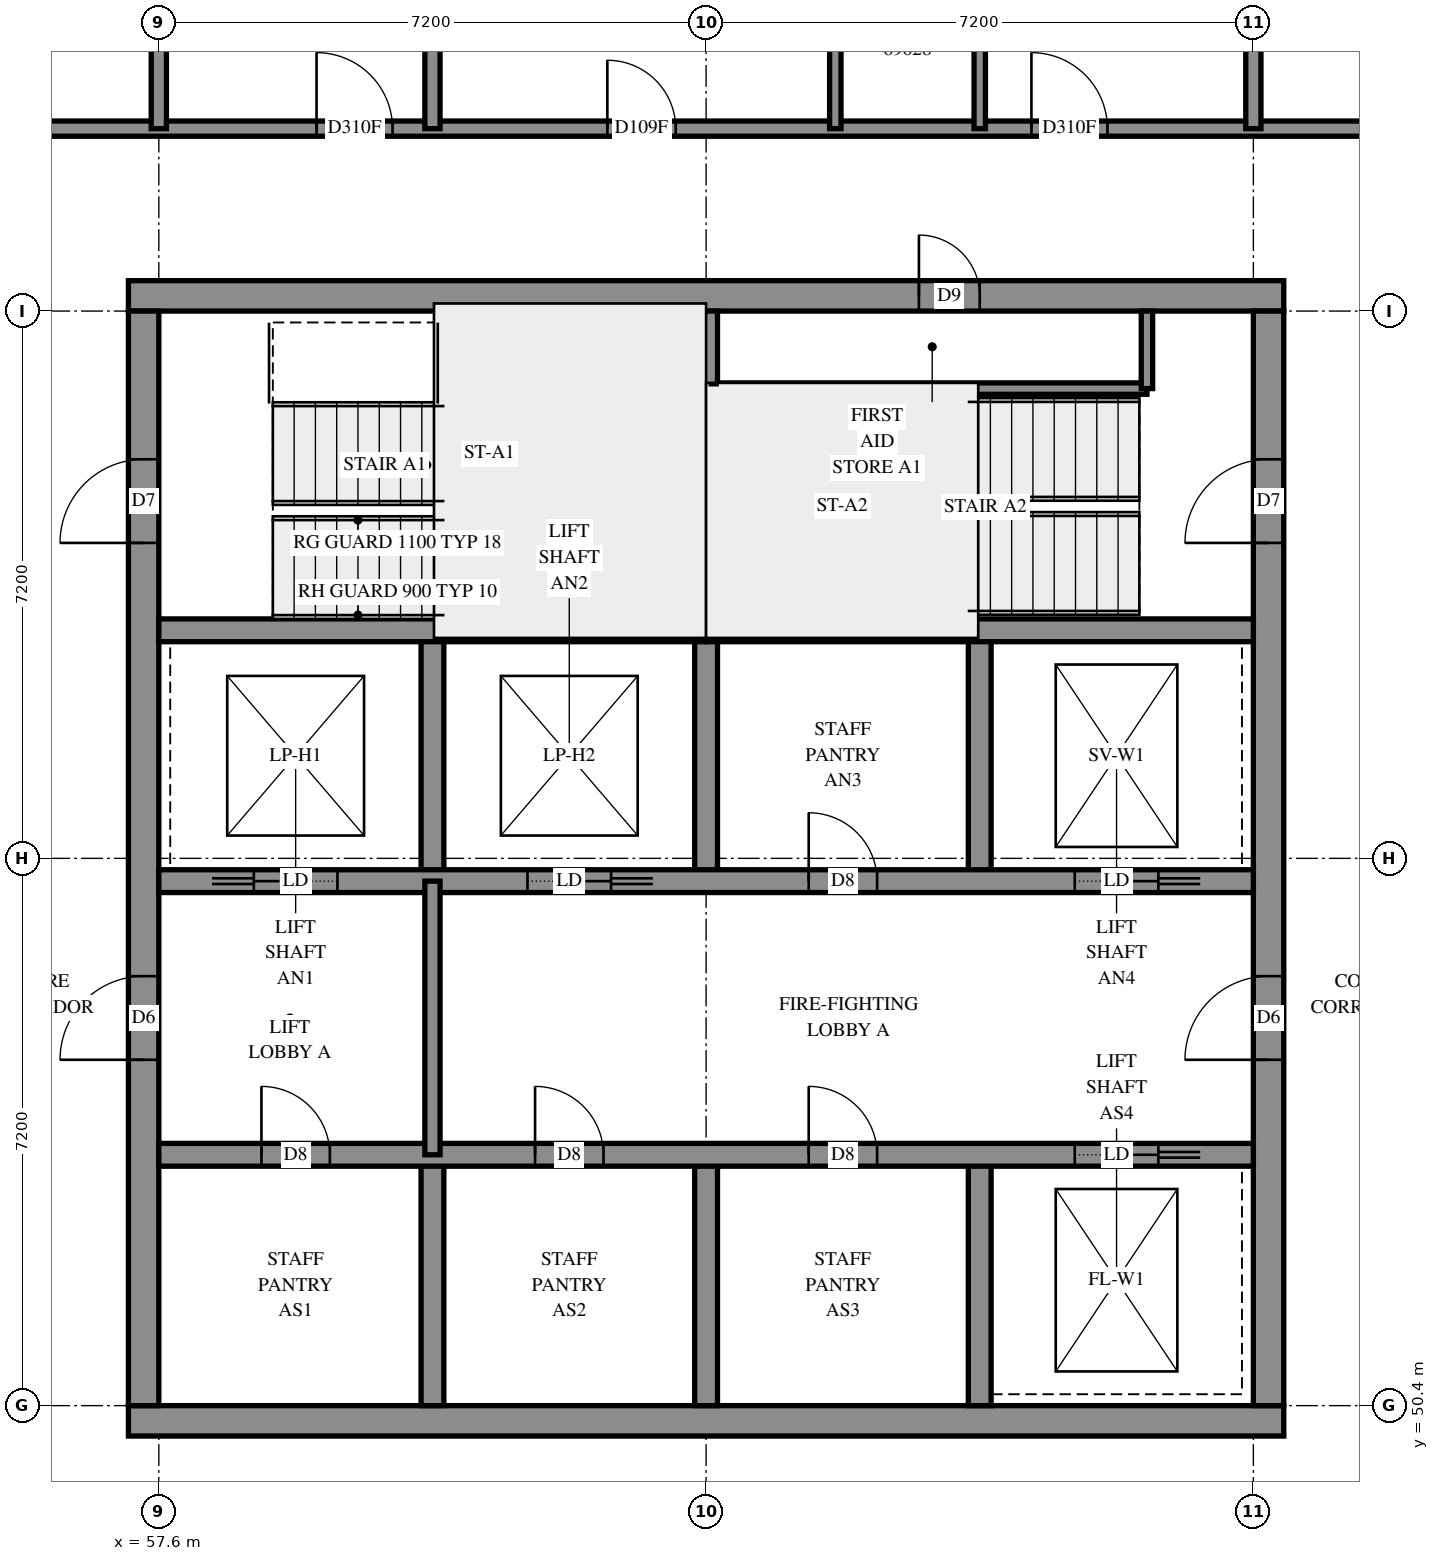
"""IFC4 building model, lengths in metres.
Left out: names, types, materials, properties, quantities, classifications, styles, units other than length and angle.
Written with IfcOpenShell. Run it as: python <this file> out.ifc"""

import sys

from ifc_helpers import new_model, si_unit, direction, frame, frame_2d, origin, place, context, subcontext, project, spatial, rectangle, extrude, element, fill, save


model = new_model("IFC4")
c1 = context("Model", 3, precision=1e-05, world=origin(), true_north=direction((0.0, 1.0)))
c2 = subcontext(c1, "Body", "Model", "MODEL_VIEW")
j1 = project(units=[si_unit("LENGTHUNIT", "METRE"), si_unit("PLANEANGLEUNIT", "RADIAN")], contexts=[c1])
p1 = place(None, origin())
s1 = spatial("IfcSite", under=j1, at=p1, CompositionType="ELEMENT")
p2 = place(p1, origin())
s2 = spatial("IfcBuilding", under=s1, at=p2, CompositionType="ELEMENT")
p3 = place(p2, frame((0.0, 0.0, 254.0)))
s3 = spatial("IfcBuildingStorey", under=s2, at=p3, CompositionType="ELEMENT", Elevation=254.0)
p4 = place(p3, frame((57.2, 50.2, -0.3), z_axis=(0.0, 0.0, 1.0), x_axis=(1.0, 0.0, 0.0)))
e1 = element("IfcWall", 1, at=p4, inside=s3, PredefinedType="SHEAR", context=c2, shape_type="SweptSolid", body=[
    extrude(rectangle(XDim=15.2, YDim=0.4, at=frame_2d((7.6, 0.0))), origin(), (0.0, 0.0, 1.0), 2.7),
])
p5 = place(p3, frame((57.2, 65.0, -0.3), z_axis=(0.0, 0.0, 1.0), x_axis=(1.0, 0.0, 0.0)))
e2 = element("IfcWall", 2, at=p5, inside=s3, PredefinedType="SHEAR", context=c2, shape_type="SweptSolid", body=[
    extrude(rectangle(XDim=15.2, YDim=0.4, at=frame_2d((7.6, 0.0))), origin(), (0.0, 0.0, 1.0), 2.7),
])
p6 = place(p5, frame((10.4, 0.0, 0.3)))
e3 = element("IfcOpeningElement", 3, at=p6, cuts=e2, PredefinedType="OPENING", context=c2, shape_type="SweptSolid", body=[
    extrude(rectangle(XDim=0.8, YDim=2.1, at=frame_2d((0.4, 1.05))), frame((0.0, 0.21, 0.0), z_axis=(0.0, -1.0, 0.0), x_axis=(1.0, 0.0, 0.0)), (0.0, 0.0, 1.0), 0.42),
])
p7 = place(p3, frame((57.4, 50.4, -0.3), z_axis=(0.0, 0.0, 1.0), x_axis=(0.0, 1.0, 0.0)))
e4 = element("IfcWall", 4, at=p7, inside=s3, PredefinedType="SHEAR", context=c2, shape_type="SweptSolid", body=[
    extrude(rectangle(XDim=14.4, YDim=0.4, at=frame_2d((7.2, 0.0))), origin(), (0.0, 0.0, 1.0), 2.7),
])
p8 = place(p7, frame((4.55, 0.0, 0.3)))
e5 = element("IfcOpeningElement", 5, at=p8, cuts=e4, PredefinedType="OPENING", context=c2, shape_type="SweptSolid", body=[
    extrude(rectangle(XDim=1.1, YDim=2.1, at=frame_2d((0.55, 1.05))), frame((0.0, 0.21, 0.0), z_axis=(0.0, -1.0, 0.0), x_axis=(1.0, 0.0, 0.0)), (0.0, 0.0, 1.0), 0.42),
])
p9 = place(p7, frame((11.35, 0.0, 0.3)))
e6 = element("IfcOpeningElement", 6, at=p9, cuts=e4, PredefinedType="OPENING", context=c2, shape_type="SweptSolid", body=[
    extrude(rectangle(XDim=1.1, YDim=2.1, at=frame_2d((0.55, 1.05))), frame((0.0, 0.21, 0.0), z_axis=(0.0, -1.0, 0.0), x_axis=(1.0, 0.0, 0.0)), (0.0, 0.0, 1.0), 0.42),
])
p10 = place(p3, frame((72.2, 50.4, -0.3), z_axis=(0.0, 0.0, 1.0), x_axis=(0.0, 1.0, 0.0)))
e7 = element("IfcWall", 7, at=p10, inside=s3, PredefinedType="SHEAR", context=c2, shape_type="SweptSolid", body=[
    extrude(rectangle(XDim=14.4, YDim=0.4, at=frame_2d((7.2, 0.0))), origin(), (0.0, 0.0, 1.0), 2.7),
])
p11 = place(p10, frame((4.55, 0.0, 0.3)))
e8 = element("IfcOpeningElement", 8, at=p11, cuts=e7, PredefinedType="OPENING", context=c2, shape_type="SweptSolid", body=[
    extrude(rectangle(XDim=1.1, YDim=2.1, at=frame_2d((0.55, 1.05))), frame((0.0, 0.21, 0.0), z_axis=(0.0, -1.0, 0.0), x_axis=(1.0, 0.0, 0.0)), (0.0, 0.0, 1.0), 0.42),
])
p12 = place(p10, frame((11.35, 0.0, 0.3)))
e9 = element("IfcOpeningElement", 9, at=p12, cuts=e7, PredefinedType="OPENING", context=c2, shape_type="SweptSolid", body=[
    extrude(rectangle(XDim=1.1, YDim=2.1, at=frame_2d((0.55, 1.05))), frame((0.0, 0.21, 0.0), z_axis=(0.0, -1.0, 0.0), x_axis=(1.0, 0.0, 0.0)), (0.0, 0.0, 1.0), 0.42),
])
for number, where, z_axis, x_axis in (
    (10, (61.2, 50.4, 0.0), (0.0, 0.0, 1.0), (0.0, 1.0, 0.0)),
    (11, (61.2, 57.3, 0.0), (0.0, 0.0, 1.0), (0.0, 1.0, 0.0)),
    (12, (64.8, 50.4, 0.0), (0.0, 0.0, 1.0), (0.0, 1.0, 0.0)),
    (13, (64.8, 57.3, 0.0), (0.0, 0.0, 1.0), (0.0, 1.0, 0.0)),
    (14, (68.4, 50.4, 0.0), (0.0, 0.0, 1.0), (0.0, 1.0, 0.0)),
    (15, (68.4, 57.3, 0.0), (0.0, 0.0, 1.0), (0.0, 1.0, 0.0)),
):
    element("IfcWall", number, at=place(p3, frame(where, z_axis=z_axis, x_axis=x_axis)), inside=s3, PredefinedType="SOLIDWALL", context=c2, shape_type="SweptSolid", body=[
        extrude(rectangle(XDim=3.3, YDim=0.3, at=frame_2d((1.65, 0.0))), origin(), (0.0, 0.0, 1.0), 3.1),
    ])
p13 = place(p3, frame((57.6, 53.7, 0.0), z_axis=(0.0, 0.0, 1.0), x_axis=(1.0, 0.0, 0.0)))
e16 = element("IfcWall", 16, at=p13, inside=s3, PredefinedType="SOLIDWALL", context=c2, shape_type="SweptSolid", body=[
    extrude(rectangle(XDim=14.4, YDim=0.3, at=frame_2d((7.2, 0.0))), origin(), (0.0, 0.0, 1.0), 3.1),
])
p14 = place(p13, frame((1.35, 0.0, 0.0)))
e17 = element("IfcOpeningElement", 17, at=p14, cuts=e16, PredefinedType="OPENING", context=c2, shape_type="SweptSolid", body=[
    extrude(rectangle(XDim=0.9, YDim=2.1, at=frame_2d((0.45, 1.05))), frame((0.0, 0.16, 0.0), z_axis=(0.0, -1.0, 0.0), x_axis=(1.0, 0.0, 0.0)), (0.0, 0.0, 1.0), 0.32),
])
p15 = place(p13, frame((4.95, 0.0, 0.0)))
e18 = element("IfcOpeningElement", 18, at=p15, cuts=e16, PredefinedType="OPENING", context=c2, shape_type="SweptSolid", body=[
    extrude(rectangle(XDim=0.9, YDim=2.1, at=frame_2d((0.45, 1.05))), frame((0.0, 0.16, 0.0), z_axis=(0.0, -1.0, 0.0), x_axis=(1.0, 0.0, 0.0)), (0.0, 0.0, 1.0), 0.32),
])
p16 = place(p13, frame((8.55, 0.0, 0.0)))
e19 = element("IfcOpeningElement", 19, at=p16, cuts=e16, PredefinedType="OPENING", context=c2, shape_type="SweptSolid", body=[
    extrude(rectangle(XDim=0.9, YDim=2.1, at=frame_2d((0.45, 1.05))), frame((0.0, 0.16, 0.0), z_axis=(0.0, -1.0, 0.0), x_axis=(1.0, 0.0, 0.0)), (0.0, 0.0, 1.0), 0.32),
])
p17 = place(p13, frame((12.05, 0.0, 0.0)))
e20 = element("IfcOpeningElement", 20, at=p17, cuts=e16, PredefinedType="OPENING", context=c2, shape_type="SweptSolid", body=[
    extrude(rectangle(XDim=1.1, YDim=2.1, at=frame_2d((0.55, 1.05))), frame((0.0, 0.16, 0.0), z_axis=(0.0, -1.0, 0.0), x_axis=(1.0, 0.0, 0.0)), (0.0, 0.0, 1.0), 0.32),
])
p18 = place(p3, frame((57.6, 57.3, 0.0), z_axis=(0.0, 0.0, 1.0), x_axis=(1.0, 0.0, 0.0)))
e21 = element("IfcWall", 21, at=p18, inside=s3, PredefinedType="SOLIDWALL", context=c2, shape_type="SweptSolid", body=[
    extrude(rectangle(XDim=14.4, YDim=0.3, at=frame_2d((7.2, 0.0))), origin(), (0.0, 0.0, 1.0), 3.1),
])
p19 = place(p18, frame((8.55, 0.0, 0.0)))
e22 = element("IfcOpeningElement", 22, at=p19, cuts=e21, PredefinedType="OPENING", context=c2, shape_type="SweptSolid", body=[
    extrude(rectangle(XDim=0.9, YDim=2.1, at=frame_2d((0.45, 1.05))), frame((0.0, 0.16, 0.0), z_axis=(0.0, -1.0, 0.0), x_axis=(1.0, 0.0, 0.0)), (0.0, 0.0, 1.0), 0.32),
])
p20 = place(p18, frame((1.25, 0.0, 0.0)))
e23 = element("IfcOpeningElement", 23, at=p20, cuts=e21, PredefinedType="OPENING", context=c2, shape_type="SweptSolid", body=[
    extrude(rectangle(XDim=1.1, YDim=2.1, at=frame_2d((0.55, 1.05))), frame((0.0, 0.16, 0.0), z_axis=(0.0, -1.0, 0.0), x_axis=(1.0, 0.0, 0.0)), (0.0, 0.0, 1.0), 0.32),
])
p21 = place(p18, frame((4.85, 0.0, 0.0)))
e24 = element("IfcOpeningElement", 24, at=p21, cuts=e21, PredefinedType="OPENING", context=c2, shape_type="SweptSolid", body=[
    extrude(rectangle(XDim=1.1, YDim=2.1, at=frame_2d((0.55, 1.05))), frame((0.0, 0.16, 0.0), z_axis=(0.0, -1.0, 0.0), x_axis=(1.0, 0.0, 0.0)), (0.0, 0.0, 1.0), 0.32),
])
p22 = place(p18, frame((12.05, 0.0, 0.0)))
e25 = element("IfcOpeningElement", 25, at=p22, cuts=e21, PredefinedType="OPENING", context=c2, shape_type="SweptSolid", body=[
    extrude(rectangle(XDim=1.1, YDim=2.1, at=frame_2d((0.55, 1.05))), frame((0.0, 0.16, 0.0), z_axis=(0.0, -1.0, 0.0), x_axis=(1.0, 0.0, 0.0)), (0.0, 0.0, 1.0), 0.32),
])
for number, where, z_axis, x_axis in (
    (26, (57.6, 60.6, 0.0), (0.0, 0.0, 1.0), (1.0, 0.0, 0.0)),
    (27, (64.8, 60.6, 0.0), (0.0, 0.0, 1.0), (1.0, 0.0, 0.0)),
):
    element("IfcWall", number, at=place(p3, frame(where, z_axis=z_axis, x_axis=x_axis)), inside=s3, PredefinedType="SOLIDWALL", context=c2, shape_type="SweptSolid", body=[
        extrude(rectangle(XDim=7.2, YDim=0.3, at=frame_2d((3.6, 0.0))), origin(), (0.0, 0.0, 1.0), 3.1),
    ])
p23 = place(p3, frame((64.8, 60.6, 0.0), z_axis=(0.0, 0.0, 1.0), x_axis=(0.0, 1.0, 0.0)))
e28 = element("IfcWall", 28, at=p23, inside=s3, PredefinedType="SOLIDWALL", context=c2, shape_type="SweptSolid", body=[
    extrude(rectangle(XDim=4.2, YDim=0.3, at=frame_2d((2.1, 0.0))), origin(), (0.0, 0.0, 1.0), 3.1),
])
p24 = place(p3, frame((64.95, 63.78, 0.0), z_axis=(0.0, 0.0, 1.0), x_axis=(1.0, 0.0, 0.0)))
e29 = element("IfcWall", 29, at=p24, inside=s3, PredefinedType="PARTITIONING", context=c2, shape_type="SweptSolid", body=[
    extrude(rectangle(XDim=5.65, YDim=0.15, at=frame_2d((2.825, 0.0))), origin(), (0.0, 0.0, 1.0), 3.1),
])
p25 = place(p3, frame((70.6, 63.78, 0.0), z_axis=(0.0, 0.0, 1.0), x_axis=(0.0, 1.0, 0.0)))
e30 = element("IfcWall", 30, at=p25, inside=s3, PredefinedType="PARTITIONING", context=c2, shape_type="SweptSolid", body=[
    extrude(rectangle(XDim=1.02, YDim=0.15, at=frame_2d((0.51, 0.0))), origin(), (0.0, 0.0, 1.0), 3.1),
])
p26 = place(p3, frame((61.2, 53.7, 0.0), z_axis=(0.0, 0.0, 1.0), x_axis=(0.0, 1.0, 0.0)))
e31 = element("IfcWall", 31, at=p26, inside=s3, PredefinedType="PARTITIONING", context=c2, shape_type="SweptSolid", body=[
    extrude(rectangle(XDim=3.6, YDim=0.2, at=frame_2d((1.8, 0.0))), origin(), (0.0, 0.0, 1.0), 3.1),
])
p27 = place(p3, frame((55.2, 67.2, 0.0), z_axis=(0.0, 0.0, 1.0), x_axis=(1.0, 0.0, 0.0)))
e32 = element("IfcWall", 32, at=p27, inside=s3, PredefinedType="PARTITIONING", context=c2, shape_type="SweptSolid", body=[
    extrude(rectangle(XDim=19.2, YDim=0.2, at=frame_2d((9.6, 0.0))), origin(), (0.0, 0.0, 1.0), 3.1),
])
p28 = place(p27, frame((4.475, 0.0, 0.0)))
e33 = element("IfcOpeningElement", 33, at=p28, cuts=e32, PredefinedType="OPENING", context=c2, shape_type="SweptSolid", body=[
    extrude(rectangle(XDim=1.0, YDim=2.1, at=frame_2d((0.5, 1.05))), frame((0.0, 0.11, 0.0), z_axis=(0.0, -1.0, 0.0), x_axis=(1.0, 0.0, 0.0)), (0.0, 0.0, 1.0), 0.22),
])
p29 = place(p27, frame((8.301, 0.0, 0.0)))
e34 = element("IfcOpeningElement", 34, at=p29, cuts=e32, PredefinedType="OPENING", context=c2, shape_type="SweptSolid", body=[
    extrude(rectangle(XDim=0.9, YDim=2.1, at=frame_2d((0.45, 1.05))), frame((0.0, 0.11, 0.0), z_axis=(0.0, -1.0, 0.0), x_axis=(1.0, 0.0, 0.0)), (0.0, 0.0, 1.0), 0.22),
])
p30 = place(p27, frame((13.88, 0.0, 0.0)))
e35 = element("IfcOpeningElement", 35, at=p30, cuts=e32, PredefinedType="OPENING", context=c2, shape_type="SweptSolid", body=[
    extrude(rectangle(XDim=1.0, YDim=2.1, at=frame_2d((0.5, 1.05))), frame((0.0, 0.11, 0.0), z_axis=(0.0, -1.0, 0.0), x_axis=(1.0, 0.0, 0.0)), (0.0, 0.0, 1.0), 0.22),
])
p31 = place(p3, frame((61.2, 67.2, 0.0), z_axis=(0.0, 0.0, 1.0), x_axis=(0.0, 1.0, 0.0)))
e36 = element("IfcWall", 36, at=p31, inside=s3, PredefinedType="PARTITIONING", context=c2, shape_type="SweptSolid", body=[
    extrude(rectangle(XDim=5.568, YDim=0.2, at=frame_2d((2.784, 0.0))), origin(), (0.0, 0.0, 1.0), 3.1),
])
p32 = place(p3, frame((57.6, 67.2, 0.0), z_axis=(0.0, 0.0, 1.0), x_axis=(0.0, 1.0, 0.0)))
e37 = element("IfcWall", 37, at=p32, inside=s3, PredefinedType="PARTITIONING", context=c2, shape_type="SweptSolid", body=[
    extrude(rectangle(XDim=4.45, YDim=0.2, at=frame_2d((2.225, 0.0))), origin(), (0.0, 0.0, 1.0), 3.1),
])
p33 = place(p3, frame((72.0, 67.2, 0.0), z_axis=(0.0, 0.0, 1.0), x_axis=(0.0, 1.0, 0.0)))
e38 = element("IfcWall", 38, at=p33, inside=s3, PredefinedType="PARTITIONING", context=c2, shape_type="SweptSolid", body=[
    extrude(rectangle(XDim=4.346, YDim=0.2, at=frame_2d((2.173, 0.0))), origin(), (0.0, 0.0, 1.0), 3.1),
])
for number, where, z_axis, x_axis in (
    (39, (66.5, 67.2, 0.0), (0.0, 0.0, 1.0), (0.0, 1.0, 0.0)),
    (40, (68.4, 67.2, 0.0), (0.0, 0.0, 1.0), (0.0, 1.0, 0.0)),
):
    element("IfcWall", number, at=place(p3, frame(where, z_axis=z_axis, x_axis=x_axis)), inside=s3, PredefinedType="PARTITIONING", context=c2, shape_type="SweptSolid", body=[
        extrude(rectangle(XDim=2.4, YDim=0.15, at=frame_2d((1.2, 0.0))), origin(), (0.0, 0.0, 1.0), 3.1),
    ])
p34 = place(p6, origin())
e41 = element("IfcDoor", 41, at=p34, inside=s3, OperationType="SINGLE_SWING_RIGHT", PredefinedType="DOOR", context=c2, shape_type="SweptSolid", body=[
    extrude(rectangle(XDim=0.8, YDim=2.1, at=frame_2d((0.4, 1.05))), frame((0.0, 0.025, 0.0), z_axis=(0.0, -1.0, 0.0), x_axis=(1.0, 0.0, 0.0)), (0.0, 0.0, 1.0), 0.05),
])
fill(e3, e41)
p35 = place(p8, origin())
e42 = element("IfcDoor", 42, at=p35, inside=s3, OperationType="DOUBLE_DOOR_SINGLE_SWING", PredefinedType="DOOR", context=c2, shape_type="SweptSolid", body=[
    extrude(rectangle(XDim=1.1, YDim=2.1, at=frame_2d((0.55, 1.05))), frame((0.0, 0.025, 0.0), z_axis=(0.0, -1.0, 0.0), x_axis=(1.0, 0.0, 0.0)), (0.0, 0.0, 1.0), 0.05),
])
fill(e5, e42)
p36 = place(p11, origin())
e43 = element("IfcDoor", 43, at=p36, inside=s3, OperationType="DOUBLE_DOOR_SINGLE_SWING", PredefinedType="DOOR", context=c2, shape_type="SweptSolid", body=[
    extrude(rectangle(XDim=1.1, YDim=2.1, at=frame_2d((0.55, 1.05))), frame((0.0, 0.025, 0.0), z_axis=(0.0, -1.0, 0.0), x_axis=(1.0, 0.0, 0.0)), (0.0, 0.0, 1.0), 0.05),
])
fill(e8, e43)
p37 = place(p9, origin())
e44 = element("IfcDoor", 44, at=p37, inside=s3, OperationType="SINGLE_SWING_LEFT", PredefinedType="DOOR", context=c2, shape_type="SweptSolid", body=[
    extrude(rectangle(XDim=1.1, YDim=2.1, at=frame_2d((0.55, 1.05))), frame((0.0, 0.025, 0.0), z_axis=(0.0, -1.0, 0.0), x_axis=(1.0, 0.0, 0.0)), (0.0, 0.0, 1.0), 0.05),
])
fill(e6, e44)
p38 = place(p12, origin())
e45 = element("IfcDoor", 45, at=p38, inside=s3, OperationType="SINGLE_SWING_RIGHT", PredefinedType="DOOR", context=c2, shape_type="SweptSolid", body=[
    extrude(rectangle(XDim=1.1, YDim=2.1, at=frame_2d((0.55, 1.05))), frame((0.0, 0.025, 0.0), z_axis=(0.0, -1.0, 0.0), x_axis=(1.0, 0.0, 0.0)), (0.0, 0.0, 1.0), 0.05),
])
fill(e9, e45)
p39 = place(p14, origin())
e46 = element("IfcDoor", 46, at=p39, inside=s3, OperationType="SINGLE_SWING_LEFT", PredefinedType="DOOR", context=c2, shape_type="SweptSolid", body=[
    extrude(rectangle(XDim=0.9, YDim=2.1, at=frame_2d((0.45, 1.05))), frame((0.0, 0.025, 0.0), z_axis=(0.0, -1.0, 0.0), x_axis=(1.0, 0.0, 0.0)), (0.0, 0.0, 1.0), 0.05),
])
fill(e17, e46)
p40 = place(p15, origin())
e47 = element("IfcDoor", 47, at=p40, inside=s3, OperationType="SINGLE_SWING_LEFT", PredefinedType="DOOR", context=c2, shape_type="SweptSolid", body=[
    extrude(rectangle(XDim=0.9, YDim=2.1, at=frame_2d((0.45, 1.05))), frame((0.0, 0.025, 0.0), z_axis=(0.0, -1.0, 0.0), x_axis=(1.0, 0.0, 0.0)), (0.0, 0.0, 1.0), 0.05),
])
fill(e18, e47)
p41 = place(p16, origin())
e48 = element("IfcDoor", 48, at=p41, inside=s3, OperationType="SINGLE_SWING_LEFT", PredefinedType="DOOR", context=c2, shape_type="SweptSolid", body=[
    extrude(rectangle(XDim=0.9, YDim=2.1, at=frame_2d((0.45, 1.05))), frame((0.0, 0.025, 0.0), z_axis=(0.0, -1.0, 0.0), x_axis=(1.0, 0.0, 0.0)), (0.0, 0.0, 1.0), 0.05),
])
fill(e19, e48)
p42 = place(p19, origin())
e49 = element("IfcDoor", 49, at=p42, inside=s3, OperationType="SINGLE_SWING_LEFT", PredefinedType="DOOR", context=c2, shape_type="SweptSolid", body=[
    extrude(rectangle(XDim=0.9, YDim=2.1, at=frame_2d((0.45, 1.05))), frame((0.0, 0.025, 0.0), z_axis=(0.0, -1.0, 0.0), x_axis=(1.0, 0.0, 0.0)), (0.0, 0.0, 1.0), 0.05),
])
fill(e22, e49)
p43 = place(p17, origin())
e50 = element("IfcDoor", 50, at=p43, inside=s3, OperationType="SLIDING_TO_RIGHT", PredefinedType="DOOR", context=c2, shape_type="SweptSolid", body=[
    extrude(rectangle(XDim=1.1, YDim=2.1, at=frame_2d((0.55, 1.05))), frame((0.0, 0.025, 0.0), z_axis=(0.0, -1.0, 0.0), x_axis=(1.0, 0.0, 0.0)), (0.0, 0.0, 1.0), 0.05),
])
fill(e20, e50)
p44 = place(p20, origin())
e51 = element("IfcDoor", 51, at=p44, inside=s3, OperationType="SLIDING_TO_LEFT", PredefinedType="DOOR", context=c2, shape_type="SweptSolid", body=[
    extrude(rectangle(XDim=1.1, YDim=2.1, at=frame_2d((0.55, 1.05))), frame((0.0, 0.025, 0.0), z_axis=(0.0, -1.0, 0.0), x_axis=(1.0, 0.0, 0.0)), (0.0, 0.0, 1.0), 0.05),
])
fill(e23, e51)
p45 = place(p21, origin())
e52 = element("IfcDoor", 52, at=p45, inside=s3, OperationType="SLIDING_TO_RIGHT", PredefinedType="DOOR", context=c2, shape_type="SweptSolid", body=[
    extrude(rectangle(XDim=1.1, YDim=2.1, at=frame_2d((0.55, 1.05))), frame((0.0, 0.025, 0.0), z_axis=(0.0, -1.0, 0.0), x_axis=(1.0, 0.0, 0.0)), (0.0, 0.0, 1.0), 0.05),
])
fill(e24, e52)
p46 = place(p22, origin())
e53 = element("IfcDoor", 53, at=p46, inside=s3, OperationType="SLIDING_TO_RIGHT", PredefinedType="DOOR", context=c2, shape_type="SweptSolid", body=[
    extrude(rectangle(XDim=1.1, YDim=2.1, at=frame_2d((0.55, 1.05))), frame((0.0, 0.025, 0.0), z_axis=(0.0, -1.0, 0.0), x_axis=(1.0, 0.0, 0.0)), (0.0, 0.0, 1.0), 0.05),
])
fill(e25, e53)
p47 = place(p28, origin())
e54 = element("IfcDoor", 54, at=p47, inside=s3, OperationType="SINGLE_SWING_RIGHT", PredefinedType="DOOR", context=c2, shape_type="SweptSolid", body=[
    extrude(rectangle(XDim=1.0, YDim=2.1, at=frame_2d((0.5, 1.05))), frame((0.0, 0.025, 0.0), z_axis=(0.0, -1.0, 0.0), x_axis=(1.0, 0.0, 0.0)), (0.0, 0.0, 1.0), 0.05),
])
fill(e33, e54)
p48 = place(p29, origin())
e55 = element("IfcDoor", 55, at=p48, inside=s3, OperationType="SINGLE_SWING_LEFT", PredefinedType="DOOR", context=c2, shape_type="SweptSolid", body=[
    extrude(rectangle(XDim=0.9, YDim=2.1, at=frame_2d((0.45, 1.05))), frame((0.0, 0.025, 0.0), z_axis=(0.0, -1.0, 0.0), x_axis=(1.0, 0.0, 0.0)), (0.0, 0.0, 1.0), 0.05),
])
fill(e34, e55)
p49 = place(p30, origin())
e56 = element("IfcDoor", 56, at=p49, inside=s3, OperationType="SINGLE_SWING_LEFT", PredefinedType="DOOR", context=c2, shape_type="SweptSolid", body=[
    extrude(rectangle(XDim=1.0, YDim=2.1, at=frame_2d((0.5, 1.05))), frame((0.0, 0.025, 0.0), z_axis=(0.0, -1.0, 0.0), x_axis=(1.0, 0.0, 0.0)), (0.0, 0.0, 1.0), 0.05),
])
fill(e35, e56)
save(model, sys.argv[1])
